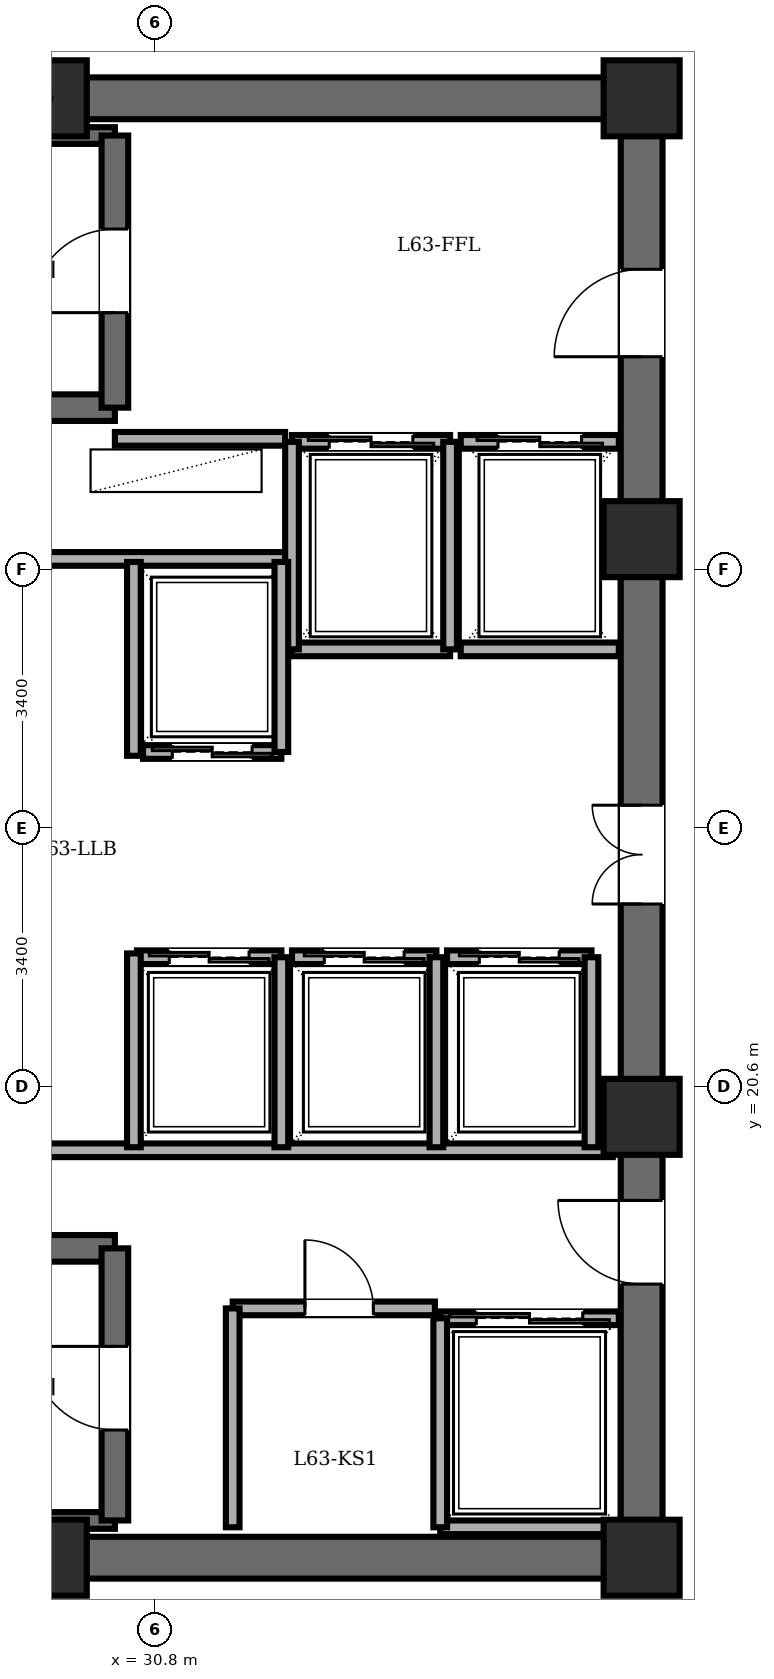
"""IFC4 building model, lengths in metres.
Left out: names, types, materials, properties, quantities, classifications, styles, units other than length and angle.
Written with IfcOpenShell. Run it as: python <this file> out.ifc"""

import sys

from ifc_helpers import new_model, si_unit, direction, frame, frame_2d, origin, origin_2d, place, context, subcontext, project, spatial, rectangle, extrude, element, fill, save


model = new_model("IFC4")
c1 = context("Model", 3, precision=1e-05, world=origin(), true_north=direction((0.0, 1.0)))
c2 = subcontext(c1, "Body", "Model", "MODEL_VIEW")
j1 = project(units=[si_unit("LENGTHUNIT", "METRE"), si_unit("PLANEANGLEUNIT", "RADIAN")], contexts=[c1])
p1 = place(None, origin())
s1 = spatial("IfcSite", under=j1, at=p1, CompositionType="ELEMENT")
p2 = place(p1, origin())
s2 = spatial("IfcBuilding", under=s1, at=p2, CompositionType="ELEMENT")
p3 = place(p2, frame((0.0, 0.0, 240.9)))
s3 = spatial("IfcBuildingStorey", under=s2, at=p3, CompositionType="ELEMENT", Elevation=240.9)
for number, where, z_axis, x_axis in (
    (1, (29.4, 14.4, 0.0), (0.0, 0.0, 1.0), (1.0, 0.0, 0.0)),
    (2, (37.2, 14.4, 0.0), (0.0, 0.0, 1.0), (1.0, 0.0, 0.0)),
    (3, (37.2, 20.2, 0.0), (0.0, 0.0, 1.0), (1.0, 0.0, 0.0)),
    (4, (37.2, 27.8, 0.0), (0.0, 0.0, 1.0), (1.0, 0.0, 0.0)),
    (5, (37.2, 33.6, 0.0), (0.0, 0.0, 1.0), (1.0, 0.0, 0.0)),
    (6, (29.4, 33.6, 0.0), (0.0, 0.0, 1.0), (1.0, 0.0, 0.0)),
):
    element("IfcColumn", number, at=place(p3, frame(where, z_axis=z_axis, x_axis=x_axis)), inside=s3, PredefinedType="COLUMN", context=c2, shape_type="SweptSolid", body=[
        extrude(rectangle(XDim=1.0, YDim=1.0, at=origin_2d()), origin(), (0.0, 0.0, 1.0), 3.6),
    ])
for number, where, z_axis, x_axis in (
    (7, (21.6, 33.6, 0.0), (0.0, 0.0, 1.0), (1.0, 0.0, 0.0)),
    (8, (37.2, 14.4, 0.0), (0.0, 0.0, 1.0), (-1.0, 0.0, 0.0)),
):
    element("IfcWall", number, at=place(p3, frame(where, z_axis=z_axis, x_axis=x_axis)), inside=s3, PredefinedType="SHEAR", context=c2, shape_type="SweptSolid", body=[
        extrude(rectangle(XDim=15.6, YDim=0.55, at=frame_2d((7.8, 0.0))), origin(), (0.0, 0.0, 1.0), 3.4),
    ])
p4 = place(p3, frame((37.2, 14.4, 0.0), z_axis=(0.0, 0.0, 1.0), x_axis=(0.0, 1.0, 0.0)))
e9 = element("IfcWall", 9, at=p4, inside=s3, PredefinedType="SHEAR", context=c2, shape_type="SweptSolid", body=[
    extrude(rectangle(XDim=19.2, YDim=0.55, at=frame_2d((9.6, 0.0))), origin(), (0.0, 0.0, 1.0), 3.4),
])
p5 = place(p4, frame((15.8, 0.0, 0.0)))
e10 = element("IfcOpeningElement", 10, at=p5, cuts=e9, PredefinedType="OPENING", context=c2, shape_type="SweptSolid", body=[
    extrude(rectangle(XDim=1.15, YDim=2.15, at=frame_2d((0.575, 1.075))), frame((0.0, 0.285, 0.0), z_axis=(0.0, -1.0, 0.0), x_axis=(1.0, 0.0, 0.0)), (0.0, 0.0, 1.0), 0.57),
])
p6 = place(p4, frame((3.6, 0.0, 0.0)))
e11 = element("IfcOpeningElement", 11, at=p6, cuts=e9, PredefinedType="OPENING", context=c2, shape_type="SweptSolid", body=[
    extrude(rectangle(XDim=1.1, YDim=2.15, at=frame_2d((0.55, 1.075))), frame((0.0, 0.285, 0.0), z_axis=(0.0, -1.0, 0.0), x_axis=(1.0, 0.0, 0.0)), (0.0, 0.0, 1.0), 0.57),
])
p7 = place(p4, frame((8.6, 0.0, 0.0)))
e12 = element("IfcOpeningElement", 12, at=p7, cuts=e9, PredefinedType="OPENING", context=c2, shape_type="SweptSolid", body=[
    extrude(rectangle(XDim=1.3, YDim=2.2, at=frame_2d((0.65, 1.1))), frame((0.0, 0.285, 0.0), z_axis=(0.0, -1.0, 0.0), x_axis=(1.0, 0.0, 0.0)), (0.0, 0.0, 1.0), 0.57),
])
p8 = place(p3, frame((22.48, 29.53, 0.0), z_axis=(0.0, 0.0, 1.0), x_axis=(1.0, 0.0, 0.0)))
e13 = element("IfcWall", 13, at=p8, inside=s3, PredefinedType="SOLIDWALL", context=c2, shape_type="SweptSolid", body=[
    extrude(rectangle(XDim=7.79, YDim=0.35, at=frame_2d((3.895, 0.0))), origin(), (0.0, 0.0, 1.0), 3.4),
])
p9 = place(p3, frame((22.48, 33.11, 0.0), z_axis=(0.0, 0.0, 1.0), x_axis=(1.0, 0.0, 0.0)))
e14 = element("IfcWall", 14, at=p9, inside=s3, PredefinedType="PARTITIONING", context=c2, shape_type="SweptSolid", body=[
    extrude(rectangle(XDim=7.79, YDim=0.22, at=frame_2d((3.895, 0.0))), origin(), (0.0, 0.0, 1.0), 3.4),
])
p10 = place(p3, frame((30.27, 29.53, 0.0), z_axis=(0.0, 0.0, 1.0), x_axis=(0.0, 1.0, 0.0)))
e15 = element("IfcWall", 15, at=p10, inside=s3, PredefinedType="SOLIDWALL", context=c2, shape_type="SweptSolid", body=[
    extrude(rectangle(XDim=3.58, YDim=0.35, at=frame_2d((1.79, 0.0))), origin(), (0.0, 0.0, 1.0), 3.4),
])
p11 = place(p10, frame((1.25, 0.0, 0.0)))
e16 = element("IfcOpeningElement", 16, at=p11, cuts=e15, PredefinedType="OPENING", context=c2, shape_type="SweptSolid", body=[
    extrude(rectangle(XDim=1.1, YDim=2.15, at=frame_2d((0.55, 1.075))), frame((0.0, 0.185, 0.0), z_axis=(0.0, -1.0, 0.0), x_axis=(1.0, 0.0, 0.0)), (0.0, 0.0, 1.0), 0.37),
])
p12 = place(p3, frame((22.48, 18.47, 0.0), z_axis=(0.0, 0.0, 1.0), x_axis=(1.0, 0.0, 0.0)))
e17 = element("IfcWall", 17, at=p12, inside=s3, PredefinedType="SOLIDWALL", context=c2, shape_type="SweptSolid", body=[
    extrude(rectangle(XDim=7.79, YDim=0.35, at=frame_2d((3.895, 0.0))), origin(), (0.0, 0.0, 1.0), 3.4),
])
p13 = place(p3, frame((22.48, 14.89, 0.0), z_axis=(0.0, 0.0, 1.0), x_axis=(1.0, 0.0, 0.0)))
e18 = element("IfcWall", 18, at=p13, inside=s3, PredefinedType="PARTITIONING", context=c2, shape_type="SweptSolid", body=[
    extrude(rectangle(XDim=7.79, YDim=0.22, at=frame_2d((3.895, 0.0))), origin(), (0.0, 0.0, 1.0), 3.4),
])
p14 = place(p3, frame((30.27, 14.89, 0.0), z_axis=(0.0, 0.0, 1.0), x_axis=(0.0, 1.0, 0.0)))
e19 = element("IfcWall", 19, at=p14, inside=s3, PredefinedType="SOLIDWALL", context=c2, shape_type="SweptSolid", body=[
    extrude(rectangle(XDim=3.58, YDim=0.35, at=frame_2d((1.79, 0.0))), origin(), (0.0, 0.0, 1.0), 3.4),
])
p15 = place(p14, frame((1.19, 0.0, 0.0)))
e20 = element("IfcOpeningElement", 20, at=p15, cuts=e19, PredefinedType="OPENING", context=c2, shape_type="SweptSolid", body=[
    extrude(rectangle(XDim=1.1, YDim=2.15, at=frame_2d((0.55, 1.075))), frame((0.0, 0.185, 0.0), z_axis=(0.0, -1.0, 0.0), x_axis=(1.0, 0.0, 0.0)), (0.0, 0.0, 1.0), 0.37),
])
p16 = place(p3, frame((30.27, 29.12, 0.0), z_axis=(0.0, 0.0, 1.0), x_axis=(1.0, 0.0, 0.0)))
e21 = element("IfcWall", 21, at=p16, inside=s3, PredefinedType="PARTITIONING", context=c2, shape_type="SweptSolid", body=[
    extrude(rectangle(XDim=2.24, YDim=0.18, at=frame_2d((1.12, 0.0))), origin(), (0.0, 0.0, 1.0), 3.4),
])
p17 = place(p3, frame((21.95, 27.54, 0.0), z_axis=(0.0, 0.0, 1.0), x_axis=(1.0, 0.0, 0.0)))
e22 = element("IfcWall", 22, at=p17, inside=s3, PredefinedType="PARTITIONING", context=c2, shape_type="SweptSolid", body=[
    extrude(rectangle(XDim=10.56, YDim=0.18, at=frame_2d((5.28, 0.0))), origin(), (0.0, 0.0, 1.0), 3.4),
])
p18 = place(p3, frame((21.95, 19.76, 0.0), z_axis=(0.0, 0.0, 1.0), x_axis=(1.0, 0.0, 0.0)))
e23 = element("IfcWall", 23, at=p18, inside=s3, PredefinedType="PARTITIONING", context=c2, shape_type="SweptSolid", body=[
    extrude(rectangle(XDim=14.87, YDim=0.18, at=frame_2d((7.435, 0.0))), origin(), (0.0, 0.0, 1.0), 3.4),
])
p19 = place(p3, frame((31.82, 17.68, 0.0), z_axis=(0.0, 0.0, 1.0), x_axis=(1.0, 0.0, 0.0)))
e24 = element("IfcWall", 24, at=p19, inside=s3, PredefinedType="PARTITIONING", context=c2, shape_type="SweptSolid", body=[
    extrude(rectangle(XDim=2.66, YDim=0.18, at=frame_2d((1.33, 0.0))), origin(), (0.0, 0.0, 1.0), 3.4),
])
p20 = place(p19, frame((0.95, 0.0, 0.0)))
e25 = element("IfcOpeningElement", 25, at=p20, cuts=e24, PredefinedType="OPENING", context=c2, shape_type="SweptSolid", body=[
    extrude(rectangle(XDim=0.9, YDim=2.05, at=frame_2d((0.45, 1.025))), frame((0.0, 0.1, 0.0), z_axis=(0.0, -1.0, 0.0), x_axis=(1.0, 0.0, 0.0)), (0.0, 0.0, 1.0), 0.2),
])
p21 = place(p3, frame((31.82, 14.8, 0.0), z_axis=(0.0, 0.0, 1.0), x_axis=(0.0, 1.0, 0.0)))
e26 = element("IfcWall", 26, at=p21, inside=s3, PredefinedType="PARTITIONING", context=c2, shape_type="SweptSolid", body=[
    extrude(rectangle(XDim=2.88, YDim=0.18, at=frame_2d((1.44, 0.0))), origin(), (0.0, 0.0, 1.0), 3.4),
])
p22 = place(p3, frame((32.6, 29.08, 0.0), z_axis=(0.0, 0.0, 1.0), x_axis=(1.0, 0.0, 0.0)))
e27 = element("IfcWall", 27, at=p22, inside=s3, PredefinedType="PARTITIONING", context=c2, shape_type="SweptSolid", body=[
    extrude(rectangle(XDim=2.08, YDim=0.18, at=frame_2d((1.04, 0.0))), origin(), (0.0, 0.0, 1.0), 3.4),
])
p23 = place(p22, frame((0.49, 0.0, 0.0)))
e28 = element("IfcOpeningElement", 28, at=p23, cuts=e27, PredefinedType="OPENING", context=c2, shape_type="SweptSolid", body=[
    extrude(rectangle(XDim=1.1, YDim=2.2, at=frame_2d((0.55, 1.1))), frame((0.0, 0.1, 0.0), z_axis=(0.0, -1.0, 0.0), x_axis=(1.0, 0.0, 0.0)), (0.0, 0.0, 1.0), 0.2),
])
p24 = place(p3, frame((34.68, 26.35, 0.0), z_axis=(0.0, 0.0, 1.0), x_axis=(-1.0, 0.0, 0.0)))
e29 = element("IfcWall", 29, at=p24, inside=s3, PredefinedType="PARTITIONING", context=c2, shape_type="SweptSolid", body=[
    extrude(rectangle(XDim=2.08, YDim=0.18, at=frame_2d((1.04, 0.0))), origin(), (0.0, 0.0, 1.0), 3.4),
])
for number, where, z_axis, x_axis in (
    (30, (34.68, 26.35, 0.0), (0.0, 0.0, 1.0), (0.0, 1.0, 0.0)),
    (31, (32.6, 29.08, 0.0), (0.0, 0.0, 1.0), (0.0, -1.0, 0.0)),
):
    element("IfcWall", number, at=place(p3, frame(where, z_axis=z_axis, x_axis=x_axis)), inside=s3, PredefinedType="PARTITIONING", context=c2, shape_type="SweptSolid", body=[
        extrude(rectangle(XDim=2.73, YDim=0.18, at=frame_2d((1.365, 0.0))), origin(), (0.0, 0.0, 1.0), 3.4),
    ])
p25 = place(p3, frame((34.82, 29.08, 0.0), z_axis=(0.0, 0.0, 1.0), x_axis=(1.0, 0.0, 0.0)))
e32 = element("IfcWall", 32, at=p25, inside=s3, PredefinedType="PARTITIONING", context=c2, shape_type="SweptSolid", body=[
    extrude(rectangle(XDim=2.08, YDim=0.18, at=frame_2d((1.04, 0.0))), origin(), (0.0, 0.0, 1.0), 3.4),
])
p26 = place(p25, frame((0.49, 0.0, 0.0)))
e33 = element("IfcOpeningElement", 33, at=p26, cuts=e32, PredefinedType="OPENING", context=c2, shape_type="SweptSolid", body=[
    extrude(rectangle(XDim=1.1, YDim=2.2, at=frame_2d((0.55, 1.1))), frame((0.0, 0.1, 0.0), z_axis=(0.0, -1.0, 0.0), x_axis=(1.0, 0.0, 0.0)), (0.0, 0.0, 1.0), 0.2),
])
p27 = place(p3, frame((36.9, 26.35, 0.0), z_axis=(0.0, 0.0, 1.0), x_axis=(-1.0, 0.0, 0.0)))
e34 = element("IfcWall", 34, at=p27, inside=s3, PredefinedType="PARTITIONING", context=c2, shape_type="SweptSolid", body=[
    extrude(rectangle(XDim=2.08, YDim=0.18, at=frame_2d((1.04, 0.0))), origin(), (0.0, 0.0, 1.0), 3.4),
])
p28 = place(p3, frame((34.55, 17.55, 0.0), z_axis=(0.0, 0.0, 1.0), x_axis=(1.0, 0.0, 0.0)))
e35 = element("IfcWall", 35, at=p28, inside=s3, PredefinedType="PARTITIONING", context=c2, shape_type="SweptSolid", body=[
    extrude(rectangle(XDim=2.35, YDim=0.18, at=frame_2d((1.175, 0.0))), origin(), (0.0, 0.0, 1.0), 3.4),
])
p29 = place(p28, frame((0.475, 0.0, 0.0)))
e36 = element("IfcOpeningElement", 36, at=p29, cuts=e35, PredefinedType="OPENING", context=c2, shape_type="SweptSolid", body=[
    extrude(rectangle(XDim=1.4, YDim=2.3, at=frame_2d((0.7, 1.15))), frame((0.0, 0.1, 0.0), z_axis=(0.0, -1.0, 0.0), x_axis=(1.0, 0.0, 0.0)), (0.0, 0.0, 1.0), 0.2),
])
p30 = place(p3, frame((36.9, 14.8, 0.0), z_axis=(0.0, 0.0, 1.0), x_axis=(-1.0, 0.0, 0.0)))
e37 = element("IfcWall", 37, at=p30, inside=s3, PredefinedType="PARTITIONING", context=c2, shape_type="SweptSolid", body=[
    extrude(rectangle(XDim=2.35, YDim=0.18, at=frame_2d((1.175, 0.0))), origin(), (0.0, 0.0, 1.0), 3.4),
])
p31 = place(p3, frame((34.55, 17.55, 0.0), z_axis=(0.0, 0.0, 1.0), x_axis=(0.0, -1.0, 0.0)))
e38 = element("IfcWall", 38, at=p31, inside=s3, PredefinedType="PARTITIONING", context=c2, shape_type="SweptSolid", body=[
    extrude(rectangle(XDim=2.75, YDim=0.18, at=frame_2d((1.375, 0.0))), origin(), (0.0, 0.0, 1.0), 3.4),
])
p32 = place(p3, frame((32.46, 25.0, 0.0), z_axis=(0.0, 0.0, 1.0), x_axis=(-1.0, 0.0, 0.0)))
e39 = element("IfcWall", 39, at=p32, inside=s3, PredefinedType="PARTITIONING", context=c2, shape_type="SweptSolid", body=[
    extrude(rectangle(XDim=1.82, YDim=0.18, at=frame_2d((0.91, 0.0))), origin(), (0.0, 0.0, 1.0), 3.4),
])
p33 = place(p32, frame((0.385, 0.0, 0.0)))
e40 = element("IfcOpeningElement", 40, at=p33, cuts=e39, PredefinedType="OPENING", context=c2, shape_type="SweptSolid", body=[
    extrude(rectangle(XDim=1.05, YDim=2.2, at=frame_2d((0.525, 1.1))), frame((0.0, 0.1, 0.0), z_axis=(0.0, -1.0, 0.0), x_axis=(1.0, 0.0, 0.0)), (0.0, 0.0, 1.0), 0.2),
])
p34 = place(p3, frame((32.46, 25.0, 0.0), z_axis=(0.0, 0.0, 1.0), x_axis=(0.0, 1.0, 0.0)))
e41 = element("IfcWall", 41, at=p34, inside=s3, PredefinedType="PARTITIONING", context=c2, shape_type="SweptSolid", body=[
    extrude(rectangle(XDim=2.5, YDim=0.18, at=frame_2d((1.25, 0.0))), origin(), (0.0, 0.0, 1.0), 3.4),
])
p35 = place(p3, frame((30.56, 22.3, 0.0), z_axis=(0.0, 0.0, 1.0), x_axis=(1.0, 0.0, 0.0)))
e42 = element("IfcWall", 42, at=p35, inside=s3, PredefinedType="PARTITIONING", context=c2, shape_type="SweptSolid", body=[
    extrude(rectangle(XDim=1.9, YDim=0.18, at=frame_2d((0.95, 0.0))), origin(), (0.0, 0.0, 1.0), 3.4),
])
p36 = place(p35, frame((0.425, 0.0, 0.0)))
e43 = element("IfcOpeningElement", 43, at=p36, cuts=e42, PredefinedType="OPENING", context=c2, shape_type="SweptSolid", body=[
    extrude(rectangle(XDim=1.05, YDim=2.2, at=frame_2d((0.525, 1.1))), frame((0.0, 0.1, 0.0), z_axis=(0.0, -1.0, 0.0), x_axis=(1.0, 0.0, 0.0)), (0.0, 0.0, 1.0), 0.2),
])
p37 = place(p3, frame((32.46, 19.8, 0.0), z_axis=(0.0, 0.0, 1.0), x_axis=(0.0, 1.0, 0.0)))
e44 = element("IfcWall", 44, at=p37, inside=s3, PredefinedType="PARTITIONING", context=c2, shape_type="SweptSolid", body=[
    extrude(rectangle(XDim=2.5, YDim=0.18, at=frame_2d((1.25, 0.0))), origin(), (0.0, 0.0, 1.0), 3.4),
])
p38 = place(p3, frame((32.6, 22.3, 0.0), z_axis=(0.0, 0.0, 1.0), x_axis=(1.0, 0.0, 0.0)))
e45 = element("IfcWall", 45, at=p38, inside=s3, PredefinedType="PARTITIONING", context=c2, shape_type="SweptSolid", body=[
    extrude(rectangle(XDim=1.9, YDim=0.18, at=frame_2d((0.95, 0.0))), origin(), (0.0, 0.0, 1.0), 3.4),
])
p39 = place(p38, frame((0.425, 0.0, 0.0)))
e46 = element("IfcOpeningElement", 46, at=p39, cuts=e45, PredefinedType="OPENING", context=c2, shape_type="SweptSolid", body=[
    extrude(rectangle(XDim=1.05, YDim=2.2, at=frame_2d((0.525, 1.1))), frame((0.0, 0.1, 0.0), z_axis=(0.0, -1.0, 0.0), x_axis=(1.0, 0.0, 0.0)), (0.0, 0.0, 1.0), 0.2),
])
p40 = place(p3, frame((34.5, 19.8, 0.0), z_axis=(0.0, 0.0, 1.0), x_axis=(0.0, 1.0, 0.0)))
e47 = element("IfcWall", 47, at=p40, inside=s3, PredefinedType="PARTITIONING", context=c2, shape_type="SweptSolid", body=[
    extrude(rectangle(XDim=2.5, YDim=0.18, at=frame_2d((1.25, 0.0))), origin(), (0.0, 0.0, 1.0), 3.4),
])
p41 = place(p3, frame((34.64, 22.3, 0.0), z_axis=(0.0, 0.0, 1.0), x_axis=(1.0, 0.0, 0.0)))
e48 = element("IfcWall", 48, at=p41, inside=s3, PredefinedType="PARTITIONING", context=c2, shape_type="SweptSolid", body=[
    extrude(rectangle(XDim=1.9, YDim=0.18, at=frame_2d((0.95, 0.0))), origin(), (0.0, 0.0, 1.0), 3.4),
])
p42 = place(p41, frame((0.425, 0.0, 0.0)))
e49 = element("IfcOpeningElement", 49, at=p42, cuts=e48, PredefinedType="OPENING", context=c2, shape_type="SweptSolid", body=[
    extrude(rectangle(XDim=1.05, YDim=2.2, at=frame_2d((0.525, 1.1))), frame((0.0, 0.1, 0.0), z_axis=(0.0, -1.0, 0.0), x_axis=(1.0, 0.0, 0.0)), (0.0, 0.0, 1.0), 0.2),
])
p43 = place(p3, frame((36.54, 19.8, 0.0), z_axis=(0.0, 0.0, 1.0), x_axis=(0.0, 1.0, 0.0)))
e50 = element("IfcWall", 50, at=p43, inside=s3, PredefinedType="PARTITIONING", context=c2, shape_type="SweptSolid", body=[
    extrude(rectangle(XDim=2.5, YDim=0.18, at=frame_2d((1.25, 0.0))), origin(), (0.0, 0.0, 1.0), 3.4),
])
for number, where, z_axis, x_axis in (
    (51, (30.52, 24.95, 0.0), (0.0, 0.0, 1.0), (0.0, 1.0, 0.0)),
    (52, (30.52, 19.8, 0.0), (0.0, 0.0, 1.0), (0.0, 1.0, 0.0)),
):
    element("IfcWall", number, at=place(p3, frame(where, z_axis=z_axis, x_axis=x_axis)), inside=s3, PredefinedType="PARTITIONING", context=c2, shape_type="SweptSolid", body=[
        extrude(rectangle(XDim=2.55, YDim=0.18, at=frame_2d((1.275, 0.0))), origin(), (0.0, 0.0, 1.0), 3.4),
    ])
p44 = place(p11, origin())
e53 = element("IfcDoor", 53, at=p44, inside=s3, OperationType="SINGLE_SWING_LEFT", PredefinedType="DOOR", context=c2, shape_type="SweptSolid", body=[
    extrude(rectangle(XDim=1.1, YDim=2.15, at=frame_2d((0.55, 1.075))), frame((0.0, 0.025, 0.0), z_axis=(0.0, -1.0, 0.0), x_axis=(1.0, 0.0, 0.0)), (0.0, 0.0, 1.0), 0.05),
])
fill(e16, e53)
p45 = place(p15, origin())
e54 = element("IfcDoor", 54, at=p45, inside=s3, OperationType="SINGLE_SWING_RIGHT", PredefinedType="DOOR", context=c2, shape_type="SweptSolid", body=[
    extrude(rectangle(XDim=1.1, YDim=2.15, at=frame_2d((0.55, 1.075))), frame((0.0, 0.025, 0.0), z_axis=(0.0, -1.0, 0.0), x_axis=(1.0, 0.0, 0.0)), (0.0, 0.0, 1.0), 0.05),
])
fill(e20, e54)
p46 = place(p5, origin())
e55 = element("IfcDoor", 55, at=p46, inside=s3, OperationType="SINGLE_SWING_LEFT", PredefinedType="DOOR", context=c2, shape_type="SweptSolid", body=[
    extrude(rectangle(XDim=1.15, YDim=2.15, at=frame_2d((0.575, 1.075))), frame((0.0, 0.025, 0.0), z_axis=(0.0, -1.0, 0.0), x_axis=(1.0, 0.0, 0.0)), (0.0, 0.0, 1.0), 0.05),
])
fill(e10, e55)
p47 = place(p6, origin())
e56 = element("IfcDoor", 56, at=p47, inside=s3, OperationType="SINGLE_SWING_RIGHT", PredefinedType="DOOR", context=c2, shape_type="SweptSolid", body=[
    extrude(rectangle(XDim=1.1, YDim=2.15, at=frame_2d((0.55, 1.075))), frame((0.0, 0.025, 0.0), z_axis=(0.0, -1.0, 0.0), x_axis=(1.0, 0.0, 0.0)), (0.0, 0.0, 1.0), 0.05),
])
fill(e11, e56)
p48 = place(p20, origin())
e57 = element("IfcDoor", 57, at=p48, inside=s3, OperationType="SINGLE_SWING_LEFT", PredefinedType="DOOR", context=c2, shape_type="SweptSolid", body=[
    extrude(rectangle(XDim=0.9, YDim=2.05, at=frame_2d((0.45, 1.025))), frame((0.0, 0.025, 0.0), z_axis=(0.0, -1.0, 0.0), x_axis=(1.0, 0.0, 0.0)), (0.0, 0.0, 1.0), 0.05),
])
fill(e25, e57)
p49 = place(p23, origin())
e58 = element("IfcDoor", 58, at=p49, inside=s3, OperationType="DOUBLE_DOOR_SLIDING", PredefinedType="DOOR", context=c2, shape_type="SweptSolid", body=[
    extrude(rectangle(XDim=1.1, YDim=2.2, at=frame_2d((0.55, 1.1))), frame((0.0, 0.025, 0.0), z_axis=(0.0, -1.0, 0.0), x_axis=(1.0, 0.0, 0.0)), (0.0, 0.0, 1.0), 0.05),
])
fill(e28, e58)
p50 = place(p26, origin())
e59 = element("IfcDoor", 59, at=p50, inside=s3, OperationType="DOUBLE_DOOR_SLIDING", PredefinedType="DOOR", context=c2, shape_type="SweptSolid", body=[
    extrude(rectangle(XDim=1.1, YDim=2.2, at=frame_2d((0.55, 1.1))), frame((0.0, 0.025, 0.0), z_axis=(0.0, -1.0, 0.0), x_axis=(1.0, 0.0, 0.0)), (0.0, 0.0, 1.0), 0.05),
])
fill(e33, e59)
p51 = place(p29, origin())
e60 = element("IfcDoor", 60, at=p51, inside=s3, OperationType="DOUBLE_DOOR_SLIDING", PredefinedType="DOOR", context=c2, shape_type="SweptSolid", body=[
    extrude(rectangle(XDim=1.4, YDim=2.3, at=frame_2d((0.7, 1.15))), frame((0.0, 0.025, 0.0), z_axis=(0.0, -1.0, 0.0), x_axis=(1.0, 0.0, 0.0)), (0.0, 0.0, 1.0), 0.05),
])
fill(e36, e60)
p52 = place(p33, origin())
e61 = element("IfcDoor", 61, at=p52, inside=s3, OperationType="DOUBLE_DOOR_SLIDING", PredefinedType="DOOR", context=c2, shape_type="SweptSolid", body=[
    extrude(rectangle(XDim=1.05, YDim=2.2, at=frame_2d((0.525, 1.1))), frame((0.0, 0.025, 0.0), z_axis=(0.0, -1.0, 0.0), x_axis=(1.0, 0.0, 0.0)), (0.0, 0.0, 1.0), 0.05),
])
fill(e40, e61)
p53 = place(p36, origin())
e62 = element("IfcDoor", 62, at=p53, inside=s3, OperationType="DOUBLE_DOOR_SLIDING", PredefinedType="DOOR", context=c2, shape_type="SweptSolid", body=[
    extrude(rectangle(XDim=1.05, YDim=2.2, at=frame_2d((0.525, 1.1))), frame((0.0, 0.025, 0.0), z_axis=(0.0, -1.0, 0.0), x_axis=(1.0, 0.0, 0.0)), (0.0, 0.0, 1.0), 0.05),
])
fill(e43, e62)
p54 = place(p39, origin())
e63 = element("IfcDoor", 63, at=p54, inside=s3, OperationType="DOUBLE_DOOR_SLIDING", PredefinedType="DOOR", context=c2, shape_type="SweptSolid", body=[
    extrude(rectangle(XDim=1.05, YDim=2.2, at=frame_2d((0.525, 1.1))), frame((0.0, 0.025, 0.0), z_axis=(0.0, -1.0, 0.0), x_axis=(1.0, 0.0, 0.0)), (0.0, 0.0, 1.0), 0.05),
])
fill(e46, e63)
p55 = place(p42, origin())
e64 = element("IfcDoor", 64, at=p55, inside=s3, OperationType="DOUBLE_DOOR_SLIDING", PredefinedType="DOOR", context=c2, shape_type="SweptSolid", body=[
    extrude(rectangle(XDim=1.05, YDim=2.2, at=frame_2d((0.525, 1.1))), frame((0.0, 0.025, 0.0), z_axis=(0.0, -1.0, 0.0), x_axis=(1.0, 0.0, 0.0)), (0.0, 0.0, 1.0), 0.05),
])
fill(e49, e64)
p56 = place(p7, origin())
e65 = element("IfcDoor", 65, at=p56, inside=s3, OperationType="DOUBLE_DOOR_SINGLE_SWING", PredefinedType="DOOR", context=c2, shape_type="SweptSolid", body=[
    extrude(rectangle(XDim=1.3, YDim=2.2, at=frame_2d((0.65, 1.1))), frame((0.0, 0.025, 0.0), z_axis=(0.0, -1.0, 0.0), x_axis=(1.0, 0.0, 0.0)), (0.0, 0.0, 1.0), 0.05),
])
fill(e12, e65)
save(model, sys.argv[1])
